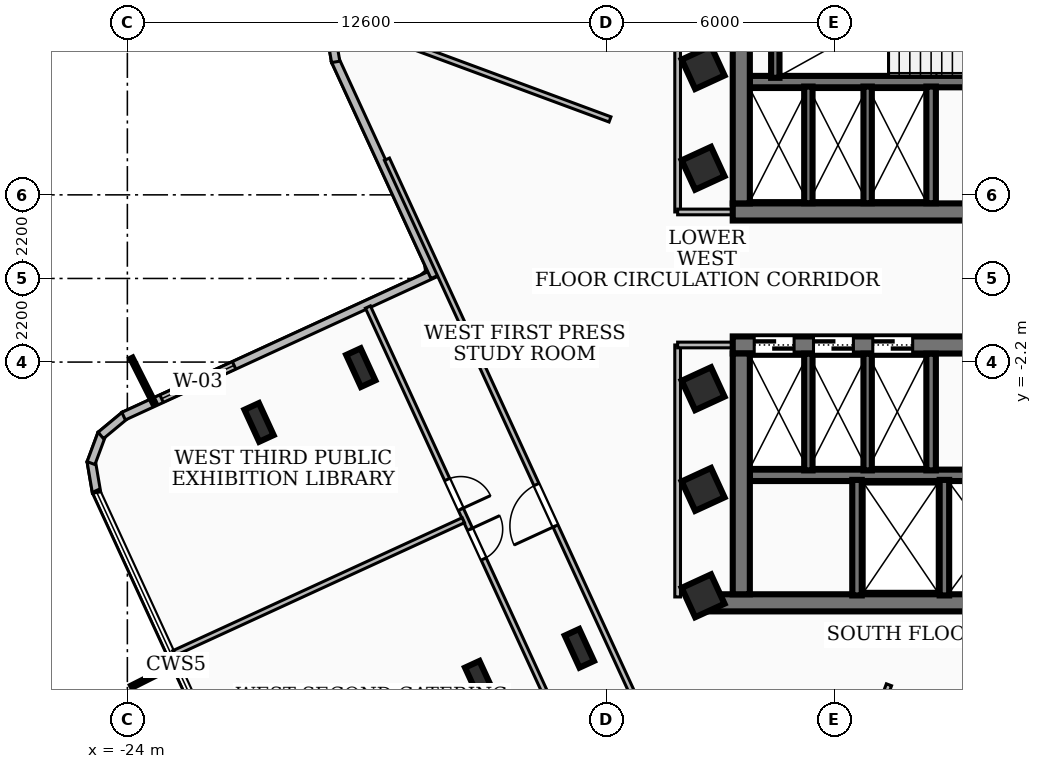
"""IFC4 building model, lengths in metres.
Left out: names, types, materials, properties, quantities, classifications, styles, units other than length and angle.
Written with IfcOpenShell. Run it as: python <this file> out.ifc"""

import sys

from ifc_helpers import new_model, si_unit, direction, frame, frame_2d, origin, origin_2d, place, context, subcontext, project, spatial, rectangle, i_section, extrude, element, fill, save


model = new_model("IFC4")
c1 = context("Model", 3, precision=1e-05, world=origin(), true_north=direction((0.0, 1.0)))
c2 = subcontext(c1, "Body", "Model", "MODEL_VIEW")
j1 = project(units=[si_unit("LENGTHUNIT", "METRE"), si_unit("PLANEANGLEUNIT", "RADIAN")], contexts=[c1])
p1 = place(None, origin())
s1 = spatial("IfcSite", under=j1, at=p1, CompositionType="ELEMENT")
p2 = place(p1, origin())
s2 = spatial("IfcBuilding", under=s1, at=p2, CompositionType="ELEMENT")
p3 = place(p2, frame((0.0, 0.0, 184.68)))
s3 = spatial("IfcBuildingStorey", under=s2, at=p3, CompositionType="ELEMENT", Elevation=184.68)
p4 = place(p3, frame((8.07, 1.75, 0.0), z_axis=(0.0, 0.0, 1.0), x_axis=(-1.0, 0.0, 0.0)))
e1 = element("IfcWall", 1, at=p4, inside=s3, PredefinedType="SHEAR", context=c2, shape_type="SweptSolid", body=[
    extrude(rectangle(XDim=16.14, YDim=0.45, at=frame_2d((8.07, 0.0))), origin(), (0.0, 0.0, 1.0), 3.34),
])
p5 = place(p4, frame((7.45, 0.0, 0.0)))
e2 = element("IfcOpeningElement", 2, at=p5, cuts=e1, PredefinedType="OPENING", context=c2, shape_type="SweptSolid", body=[
    extrude(rectangle(XDim=1.0, YDim=2.1, at=frame_2d((0.5, 1.05))), frame((0.0, 0.235, 0.0), z_axis=(0.0, -1.0, 0.0), x_axis=(1.0, 0.0, 0.0)), (0.0, 0.0, 1.0), 0.47),
])
p6 = place(p4, frame((3.4, 0.0, 0.0)))
e3 = element("IfcOpeningElement", 3, at=p6, cuts=e1, PredefinedType="OPENING", context=c2, shape_type="SweptSolid", body=[
    extrude(rectangle(XDim=0.9, YDim=2.06, at=frame_2d((0.45, 1.03))), frame((0.0, 0.235, 0.0), z_axis=(0.0, -1.0, 0.0), x_axis=(1.0, 0.0, 0.0)), (0.0, 0.0, 1.0), 0.47),
])
p7 = place(p4, frame((1.1, 0.0, 0.0)))
e4 = element("IfcOpeningElement", 4, at=p7, cuts=e1, PredefinedType="OPENING", context=c2, shape_type="SweptSolid", body=[
    extrude(rectangle(XDim=0.9, YDim=2.06, at=frame_2d((0.45, 1.03))), frame((0.0, 0.235, 0.0), z_axis=(0.0, -1.0, 0.0), x_axis=(1.0, 0.0, 0.0)), (0.0, 0.0, 1.0), 0.47),
])
p8 = place(p3, frame((-7.845, 1.975, 0.0), z_axis=(0.0, 0.0, 1.0), x_axis=(0.0, 1.0, 0.0)))
e5 = element("IfcWall", 5, at=p8, inside=s3, PredefinedType="SHEAR", context=c2, shape_type="SweptSolid", body=[
    extrude(rectangle(XDim=6.335, YDim=0.45, at=frame_2d((3.167, 0.0))), origin(), (0.0, 0.0, 1.0), 3.34),
])
p9 = place(p3, frame((7.62, 5.18, 0.0), z_axis=(0.0, 0.0, 1.0), x_axis=(-1.0, 0.0, 0.0)))
e6 = element("IfcWall", 6, at=p9, inside=s3, PredefinedType="SOLIDWALL", context=c2, shape_type="SweptSolid", body=[
    extrude(rectangle(XDim=15.24, YDim=0.3, at=frame_2d((7.62, 0.0))), origin(), (0.0, 0.0, 1.0), 3.34),
])
p10 = place(p9, frame((5.77, 0.0, 0.0)))
e7 = element("IfcOpeningElement", 7, at=p10, cuts=e6, PredefinedType="OPENING", context=c2, shape_type="SweptSolid", body=[
    extrude(rectangle(XDim=1.1, YDim=2.15, at=frame_2d((0.55, 1.075))), frame((0.0, 0.16, 0.0), z_axis=(0.0, -1.0, 0.0), x_axis=(1.0, 0.0, 0.0)), (0.0, 0.0, 1.0), 0.32),
])
p11 = place(p9, frame((2.97, 0.0, 0.0)))
e8 = element("IfcOpeningElement", 8, at=p11, cuts=e6, PredefinedType="OPENING", context=c2, shape_type="SweptSolid", body=[
    extrude(rectangle(XDim=1.1, YDim=2.15, at=frame_2d((0.55, 1.075))), frame((0.0, 0.16, 0.0), z_axis=(0.0, -1.0, 0.0), x_axis=(1.0, 0.0, 0.0)), (0.0, 0.0, 1.0), 0.32),
])
p12 = place(p9, frame((7.97, 0.0, 0.0)))
e9 = element("IfcOpeningElement", 9, at=p12, cuts=e6, PredefinedType="OPENING", context=c2, shape_type="SweptSolid", body=[
    extrude(rectangle(XDim=1.0, YDim=2.1, at=frame_2d((0.5, 1.05))), frame((0.0, 0.16, 0.0), z_axis=(0.0, -1.0, 0.0), x_axis=(1.0, 0.0, 0.0)), (0.0, 0.0, 1.0), 0.32),
])
p13 = place(p3, frame((8.78, -8.535, 0.0), z_axis=(0.0, 0.0, 1.0), x_axis=(-1.0, 0.0, 0.0)))
e10 = element("IfcWall", 10, at=p13, inside=s3, PredefinedType="SHEAR", context=c2, shape_type="SweptSolid", body=[
    extrude(rectangle(XDim=17.56, YDim=0.45, at=frame_2d((8.78, 0.0))), origin(), (0.0, 0.0, 1.0), 3.34),
])
p14 = place(p3, frame((-8.07, -1.75, 0.0), z_axis=(0.0, 0.0, 1.0), x_axis=(1.0, 0.0, 0.0)))
e11 = element("IfcWall", 11, at=p14, inside=s3, PredefinedType="SHEAR", context=c2, shape_type="SweptSolid", body=[
    extrude(rectangle(XDim=16.14, YDim=0.45, at=frame_2d((8.07, 0.0))), origin(), (0.0, 0.0, 1.0), 3.34),
])
p15 = place(p14, frame((7.45, 0.0, 0.0)))
e12 = element("IfcOpeningElement", 12, at=p15, cuts=e11, PredefinedType="OPENING", context=c2, shape_type="SweptSolid", body=[
    extrude(rectangle(XDim=1.0, YDim=2.1, at=frame_2d((0.5, 1.05))), frame((0.0, 0.235, 0.0), z_axis=(0.0, -1.0, 0.0), x_axis=(1.0, 0.0, 0.0)), (0.0, 0.0, 1.0), 0.47),
])
p16 = place(p14, frame((12.65, 0.0, 0.0)))
e13 = element("IfcOpeningElement", 13, at=p16, cuts=e11, PredefinedType="OPENING", context=c2, shape_type="SweptSolid", body=[
    extrude(rectangle(XDim=0.9, YDim=2.06, at=frame_2d((0.45, 1.03))), frame((0.0, 0.235, 0.0), z_axis=(0.0, -1.0, 0.0), x_axis=(1.0, 0.0, 0.0)), (0.0, 0.0, 1.0), 0.47),
])
p17 = place(p14, frame((0.565, 0.0, 0.0)))
e14 = element("IfcOpeningElement", 14, at=p17, cuts=e11, PredefinedType="OPENING", context=c2, shape_type="SweptSolid", body=[
    extrude(rectangle(XDim=1.05, YDim=2.15, at=frame_2d((0.525, 1.075))), frame((0.0, 0.235, 0.0), z_axis=(0.0, -1.0, 0.0), x_axis=(1.0, 0.0, 0.0)), (0.0, 0.0, 1.0), 0.47),
])
p18 = place(p14, frame((2.125, 0.0, 0.0)))
e15 = element("IfcOpeningElement", 15, at=p18, cuts=e11, PredefinedType="OPENING", context=c2, shape_type="SweptSolid", body=[
    extrude(rectangle(XDim=1.05, YDim=2.15, at=frame_2d((0.525, 1.075))), frame((0.0, 0.235, 0.0), z_axis=(0.0, -1.0, 0.0), x_axis=(1.0, 0.0, 0.0)), (0.0, 0.0, 1.0), 0.47),
])
p19 = place(p14, frame((3.685, 0.0, 0.0)))
e16 = element("IfcOpeningElement", 16, at=p19, cuts=e11, PredefinedType="OPENING", context=c2, shape_type="SweptSolid", body=[
    extrude(rectangle(XDim=1.05, YDim=2.15, at=frame_2d((0.525, 1.075))), frame((0.0, 0.235, 0.0), z_axis=(0.0, -1.0, 0.0), x_axis=(1.0, 0.0, 0.0)), (0.0, 0.0, 1.0), 0.47),
])
p20 = place(p3, frame((-7.845, -8.31, 0.0), z_axis=(0.0, 0.0, 1.0), x_axis=(0.0, 1.0, 0.0)))
e17 = element("IfcWall", 17, at=p20, inside=s3, PredefinedType="SHEAR", context=c2, shape_type="SweptSolid", body=[
    extrude(rectangle(XDim=6.335, YDim=0.45, at=frame_2d((3.167, 0.0))), origin(), (0.0, 0.0, 1.0), 3.34),
])
p21 = place(p3, frame((-7.62, -5.18, 0.0), z_axis=(0.0, 0.0, 1.0), x_axis=(1.0, 0.0, 0.0)))
e18 = element("IfcWall", 18, at=p21, inside=s3, PredefinedType="SOLIDWALL", context=c2, shape_type="SweptSolid", body=[
    extrude(rectangle(XDim=15.24, YDim=0.3, at=frame_2d((7.62, 0.0))), origin(), (0.0, 0.0, 1.0), 3.34),
])
p22 = place(p21, frame((5.77, 0.0, 0.0)))
e19 = element("IfcOpeningElement", 19, at=p22, cuts=e18, PredefinedType="OPENING", context=c2, shape_type="SweptSolid", body=[
    extrude(rectangle(XDim=1.1, YDim=2.15, at=frame_2d((0.55, 1.075))), frame((0.0, 0.16, 0.0), z_axis=(0.0, -1.0, 0.0), x_axis=(1.0, 0.0, 0.0)), (0.0, 0.0, 1.0), 0.32),
])
p23 = place(p21, frame((7.97, 0.0, 0.0)))
e20 = element("IfcOpeningElement", 20, at=p23, cuts=e18, PredefinedType="OPENING", context=c2, shape_type="SweptSolid", body=[
    extrude(rectangle(XDim=1.0, YDim=2.1, at=frame_2d((0.5, 1.05))), frame((0.0, 0.16, 0.0), z_axis=(0.0, -1.0, 0.0), x_axis=(1.0, 0.0, 0.0)), (0.0, 0.0, 1.0), 0.32),
])
p24 = place(p3, frame((-6.95, 5.28, 0.0), z_axis=(0.0, 0.0, 1.0), x_axis=(0.0, 1.0, 0.0)))
e21 = element("IfcWall", 21, at=p24, inside=s3, PredefinedType="SOLIDWALL", context=c2, shape_type="SweptSolid", body=[
    extrude(rectangle(XDim=3.06, YDim=0.22, at=frame_2d((1.53, 0.0))), origin(), (0.0, 0.0, 1.0), 3.34),
])
p25 = place(p3, frame((-2.85, 1.98, 0.0), z_axis=(0.0, 0.0, 1.0), x_axis=(0.0, 1.0, 0.0)))
e22 = element("IfcWall", 22, at=p25, inside=s3, PredefinedType="SOLIDWALL", context=c2, shape_type="SweptSolid", body=[
    extrude(rectangle(XDim=3.07, YDim=0.25, at=frame_2d((1.535, 0.0))), origin(), (0.0, 0.0, 1.0), 3.34),
])
for number, where, z_axis, x_axis in (
    (23, (-2.5, -8.34, 0.0), (0.0, 0.0, 1.0), (0.0, 1.0, 0.0)),
    (24, (-4.8, -8.34, 0.0), (0.0, 0.0, 1.0), (0.0, 1.0, 0.0)),
):
    element("IfcWall", number, at=place(p3, frame(where, z_axis=z_axis, x_axis=x_axis)), inside=s3, PredefinedType="SOLIDWALL", context=c2, shape_type="SweptSolid", body=[
        extrude(rectangle(XDim=3.04, YDim=0.25, at=frame_2d((1.52, 0.0))), origin(), (0.0, 0.0, 1.0), 3.34),
    ])
p26 = place(p3, frame((-2.85, -5.05, 0.0), z_axis=(0.0, 0.0, 1.0), x_axis=(0.0, 1.0, 0.0)))
e25 = element("IfcWall", 25, at=p26, inside=s3, PredefinedType="SOLIDWALL", context=c2, shape_type="SweptSolid", body=[
    extrude(rectangle(XDim=3.07, YDim=0.25, at=frame_2d((1.535, 0.0))), origin(), (0.0, 0.0, 1.0), 3.34),
])
for number, where, z_axis, x_axis in (
    (26, (-6.08, 1.98, 0.0), (0.0, 0.0, 1.0), (0.0, 1.0, 0.0)),
    (27, (-4.52, 1.98, 0.0), (0.0, 0.0, 1.0), (0.0, 1.0, 0.0)),
    (28, (-6.08, -5.05, 0.0), (0.0, 0.0, 1.0), (0.0, 1.0, 0.0)),
    (29, (-4.52, -5.05, 0.0), (0.0, 0.0, 1.0), (0.0, 1.0, 0.0)),
):
    element("IfcWall", number, at=place(p3, frame(where, z_axis=z_axis, x_axis=x_axis)), inside=s3, PredefinedType="SOLIDWALL", context=c2, shape_type="SweptSolid", body=[
        extrude(rectangle(XDim=3.07, YDim=0.22, at=frame_2d((1.535, 0.0))), origin(), (0.0, 0.0, 1.0), 3.34),
    ])
for number, where, z_axis, x_axis in (
    (30, (-8.85, -5.55, 0.0), (0.0, 0.0, 1.0), (0.909, 0.418, 0.0)),
    (31, (-8.85, -2.9, 0.0), (0.0, 0.0, 1.0), (0.909, 0.418, 0.0)),
    (32, (-8.85, 2.9, 0.0), (0.0, 0.0, 1.0), (0.909, 0.418, 0.0)),
    (33, (-8.85, 5.55, 0.0), (0.0, 0.0, 1.0), (0.909, 0.418, 0.0)),
    (34, (-8.85, -8.35, 0.0), (0.0, 0.0, 1.0), (0.909, 0.418, 0.0)),
):
    element("IfcColumn", number, at=place(p3, frame(where, z_axis=z_axis, x_axis=x_axis)), inside=s3, PredefinedType="COLUMN", context=c2, shape_type="SweptSolid", body=[
        extrude(rectangle(XDim=0.85, YDim=0.85, at=origin_2d()), origin(), (0.0, 0.0, 1.0), 3.6),
    ])
for number, where, z_axis, x_axis in (
    (35, (-17.858, -2.346, 0.0), (0.0, 0.0, 1.0), (0.909, 0.418, 0.0)),
    (36, (-12.106, -9.731, 0.0), (0.0, 0.0, 1.0), (0.909, 0.418, 0.0)),
    (37, (-20.535, -3.788, 0.0), (0.0, 0.0, 1.0), (0.909, 0.418, 0.0)),
    (38, (-14.731, -10.573, 0.0), (0.0, 0.0, 1.0), (0.909, 0.418, 0.0)),
):
    element("IfcColumn", number, at=place(p3, frame(where, z_axis=z_axis, x_axis=x_axis)), inside=s3, PredefinedType="COLUMN", context=c2, shape_type="SweptSolid", body=[
        extrude(i_section(OverallWidth=0.418, OverallDepth=0.927, WebThickness=0.019, FlangeThickness=0.032, at=origin_2d()), origin(), (0.0, 0.0, 1.0), 3.6),
    ])
p27 = place(p3, frame((-24.811, -5.633, 0.0), z_axis=(0.0, 0.0, 1.0), x_axis=(-0.167575597201, 0.985859228908, 0.0)))
e39 = element("IfcWall", 39, at=p27, inside=s3, PredefinedType="SOLIDWALL", context=c2, shape_type="SweptSolid", body=[
    extrude(rectangle(XDim=0.835, YDim=0.22, at=frame_2d((0.417, 0.0))), origin(), (0.0, 0.0, 1.0), 3.34),
])
p28 = place(p3, frame((-24.956, -4.858, 0.0), z_axis=(0.0, 0.0, 1.0), x_axis=(0.348538641681, 0.937294412261, 0.0)))
e40 = element("IfcWall", 40, at=p28, inside=s3, PredefinedType="SOLIDWALL", context=c2, shape_type="SweptSolid", body=[
    extrude(rectangle(XDim=0.818, YDim=0.22, at=frame_2d((0.409, 0.0))), origin(), (0.0, 0.0, 1.0), 3.34),
])
p29 = place(p3, frame((-24.699, -4.13, 0.0), z_axis=(0.0, 0.0, 1.0), x_axis=(0.769466854359, 0.638686746413, 0.0)))
e41 = element("IfcWall", 41, at=p29, inside=s3, PredefinedType="SOLIDWALL", context=c2, shape_type="SweptSolid", body=[
    extrude(rectangle(XDim=0.834, YDim=0.22, at=frame_2d((0.417, 0.0))), origin(), (0.0, 0.0, 1.0), 3.34),
])
p30 = place(p3, frame((-24.099, -3.623, 0.0), z_axis=(0.0, 0.0, 1.0), x_axis=(0.908673527814, 0.417507388977, 0.0)))
e42 = element("IfcWall", 42, at=p30, inside=s3, PredefinedType="SOLIDWALL", context=c2, shape_type="SweptSolid", body=[
    extrude(rectangle(XDim=9.059, YDim=0.22, at=frame_2d((4.529, 0.0))), origin(), (0.0, 0.0, 1.0), 3.34),
])
p31 = place(p30, frame((1.1, 0.0, 0.85)))
e43 = element("IfcOpeningElement", 43, at=p31, cuts=e42, PredefinedType="OPENING", context=c2, shape_type="SweptSolid", body=[
    extrude(rectangle(XDim=2.1, YDim=2.0, at=frame_2d((1.05, 1.0))), frame((0.0, 0.12, 0.0), z_axis=(0.0, -1.0, 0.0), x_axis=(1.0, 0.0, 0.0)), (0.0, 0.0, 1.0), 0.24),
])
p32 = place(p3, frame((-15.911, 0.042, 0.0), z_axis=(0.0, 0.0, 1.0), x_axis=(-0.417479344719, 0.908686412759, 0.0)))
e44 = element("IfcWall", 44, at=p32, inside=s3, PredefinedType="SOLIDWALL", context=c2, shape_type="SweptSolid", body=[
    extrude(rectangle(XDim=6.278, YDim=0.22, at=frame_2d((3.139, 0.0))), origin(), (0.0, 0.0, 1.0), 3.34),
])
p33 = place(p3, frame((-18.518, 5.699, 0.0), z_axis=(0.0, 0.0, 1.0), x_axis=(-0.167382556682, 0.985892022342, 0.0)))
e45 = element("IfcWall", 45, at=p33, inside=s3, PredefinedType="SOLIDWALL", context=c2, shape_type="SweptSolid", body=[
    extrude(rectangle(XDim=0.836, YDim=0.22, at=frame_2d((0.418, 0.0))), origin(), (0.0, 0.0, 1.0), 3.34),
])
p34 = place(p3, frame((-9.52, 1.75, 0.0), z_axis=(0.0, 0.0, 1.0), x_axis=(0.0, 1.0, 0.0)))
e46 = element("IfcWall", 46, at=p34, inside=s3, PredefinedType="PARTITIONING", context=c2, shape_type="SweptSolid", body=[
    extrude(rectangle(XDim=6.63, YDim=0.15, at=frame_2d((3.315, 0.0))), origin(), (0.0, 0.0, 1.0), 3.34),
])
p35 = place(p3, frame((-7.85, 1.75, 0.0), z_axis=(0.0, 0.0, 1.0), x_axis=(-1.0, 0.0, 0.0)))
e47 = element("IfcWall", 47, at=p35, inside=s3, PredefinedType="PARTITIONING", context=c2, shape_type="SweptSolid", body=[
    extrude(rectangle(XDim=1.67, YDim=0.15, at=frame_2d((0.835, 0.0))), origin(), (0.0, 0.0, 1.0), 2.57),
])
p36 = place(p3, frame((-9.52, -8.38, 0.0), z_axis=(0.0, 0.0, 1.0), x_axis=(0.0, 1.0, 0.0)))
e48 = element("IfcWall", 48, at=p36, inside=s3, PredefinedType="PARTITIONING", context=c2, shape_type="SweptSolid", body=[
    extrude(rectangle(XDim=6.63, YDim=0.15, at=frame_2d((3.315, 0.0))), origin(), (0.0, 0.0, 1.0), 2.644),
])
p37 = place(p3, frame((-7.85, -1.75, 0.0), z_axis=(0.0, 0.0, 1.0), x_axis=(-1.0, 0.0, 0.0)))
e49 = element("IfcWall", 49, at=p37, inside=s3, PredefinedType="PARTITIONING", context=c2, shape_type="SweptSolid", body=[
    extrude(rectangle(XDim=1.67, YDim=0.15, at=frame_2d((0.835, 0.0))), origin(), (0.0, 0.0, 1.0), 2.57),
])
p38 = place(p3, frame((-11.3, 4.185, 0.0), z_axis=(0.0, 0.0, 1.0), x_axis=(-0.937797421925, 0.347182942311, 0.0)))
e50 = element("IfcWall", 50, at=p38, inside=s3, PredefinedType="PARTITIONING", context=c2, shape_type="SweptSolid", body=[
    extrude(rectangle(XDim=7.624, YDim=0.145, at=frame_2d((3.812, 0.0))), origin(), (0.0, 0.0, 1.0), 3.34),
])
p39 = place(p3, frame((-3.959, -10.691, 0.0), z_axis=(0.0, 0.0, 1.0), x_axis=(-0.347243238044, -0.937775097576, 0.0)))
e51 = element("IfcWall", 51, at=p39, inside=s3, PredefinedType="PARTITIONING", context=c2, shape_type="SweptSolid", body=[
    extrude(rectangle(XDim=8.274, YDim=0.145, at=frame_2d((4.137, 0.0))), origin(), (0.0, 0.0, 1.0), 3.34),
])
p40 = place(p3, frame((-8.6, -15.508, 0.0), z_axis=(0.0, 0.0, 1.0), x_axis=(-0.41757132443, 0.908644148726, 0.0)))
e52 = element("IfcWall", 52, at=p40, inside=s3, PredefinedType="PARTITIONING", context=c2, shape_type="SweptSolid", body=[
    extrude(rectangle(XDim=20.521, YDim=0.145, at=frame_2d((10.26, 0.0))), origin(), (0.0, 0.0, 1.0), 2.644),
])
p41 = place(p40, frame((9.9, 0.0, 0.0)))
e53 = element("IfcOpeningElement", 53, at=p41, cuts=e52, PredefinedType="OPENING", context=c2, shape_type="SweptSolid", body=[
    extrude(rectangle(XDim=1.2, YDim=2.1, at=frame_2d((0.6, 1.05))), frame((0.0, 0.083, 0.0), z_axis=(0.0, -1.0, 0.0), x_axis=(1.0, 0.0, 0.0)), (0.0, 0.0, 1.0), 0.165),
])
p42 = place(p3, frame((-15.159, -6.361, 0.0), z_axis=(0.0, 0.0, 1.0), x_axis=(-0.90866370778, -0.417528760881, 0.0)))
e54 = element("IfcWall", 54, at=p42, inside=s3, PredefinedType="PARTITIONING", context=c2, shape_type="SweptSolid", body=[
    extrude(rectangle(XDim=8.385, YDim=0.145, at=frame_2d((4.192, 0.0))), origin(), (0.0, 0.0, 1.0), 3.34),
])
p43 = place(p3, frame((-17.67, -0.752, 0.0), z_axis=(0.0, 0.0, 1.0), x_axis=(0.41749974953, -0.908677037864, 0.0)))
e55 = element("IfcWall", 55, at=p43, inside=s3, PredefinedType="PARTITIONING", context=c2, shape_type="SweptSolid", body=[
    extrude(rectangle(XDim=12.91, YDim=0.145, at=frame_2d((6.455, 0.0))), origin(), (0.0, 0.0, 1.0), 2.644),
])
p44 = place(p43, frame((4.995, 0.0, 0.0)))
e56 = element("IfcOpeningElement", 56, at=p44, cuts=e55, PredefinedType="OPENING", context=c2, shape_type="SweptSolid", body=[
    extrude(rectangle(XDim=0.86, YDim=2.04, at=frame_2d((0.43, 1.02))), frame((0.0, 0.083, 0.0), z_axis=(0.0, -1.0, 0.0), x_axis=(1.0, 0.0, 0.0)), (0.0, 0.0, 1.0), 0.165),
])
p45 = place(p43, frame((6.435, 0.0, 0.0)))
e57 = element("IfcOpeningElement", 57, at=p45, cuts=e55, PredefinedType="OPENING", context=c2, shape_type="SweptSolid", body=[
    extrude(rectangle(XDim=0.86, YDim=2.04, at=frame_2d((0.43, 1.02))), frame((0.0, 0.083, 0.0), z_axis=(0.0, -1.0, 0.0), x_axis=(1.0, 0.0, 0.0)), (0.0, 0.0, 1.0), 0.165),
])
p46 = place(p3, frame((15.508, -8.6, 0.0), z_axis=(0.0, 0.0, 1.0), x_axis=(-0.908644148726, -0.41757132443, 0.0)))
e58 = element("IfcWall", 58, at=p46, inside=s3, PredefinedType="PARTITIONING", context=c2, shape_type="SweptSolid", body=[
    extrude(rectangle(XDim=20.521, YDim=0.145, at=frame_2d((10.26, 0.0))), origin(), (0.0, 0.0, 1.0), 2.644),
])
p47 = place(p46, frame((9.9, 0.0, 0.0)))
e59 = element("IfcOpeningElement", 59, at=p47, cuts=e58, PredefinedType="OPENING", context=c2, shape_type="SweptSolid", body=[
    extrude(rectangle(XDim=1.2, YDim=2.1, at=frame_2d((0.6, 1.05))), frame((0.0, 0.083, 0.0), z_axis=(0.0, -1.0, 0.0), x_axis=(1.0, 0.0, 0.0)), (0.0, 0.0, 1.0), 0.165),
])
p48 = place(p31, origin())
e60 = element("IfcWindow", 60, at=p48, inside=s3, PartitioningType="SINGLE_PANEL", PredefinedType="WINDOW", context=c2, shape_type="SweptSolid", body=[
    extrude(rectangle(XDim=2.1, YDim=2.0, at=frame_2d((1.05, 1.0))), frame((0.0, 0.03, 0.0), z_axis=(0.0, -1.0, 0.0), x_axis=(1.0, 0.0, 0.0)), (0.0, 0.0, 1.0), 0.06),
])
fill(e43, e60)
p49 = place(p17, origin())
e61 = element("IfcDoor", 61, at=p49, inside=s3, OperationType="DOUBLE_DOOR_SLIDING", PredefinedType="DOOR", context=c2, shape_type="SweptSolid", body=[
    extrude(rectangle(XDim=1.05, YDim=2.15, at=frame_2d((0.525, 1.075))), frame((0.0, 0.025, 0.0), z_axis=(0.0, -1.0, 0.0), x_axis=(1.0, 0.0, 0.0)), (0.0, 0.0, 1.0), 0.05),
])
fill(e14, e61)
p50 = place(p18, origin())
e62 = element("IfcDoor", 62, at=p50, inside=s3, OperationType="DOUBLE_DOOR_SLIDING", PredefinedType="DOOR", context=c2, shape_type="SweptSolid", body=[
    extrude(rectangle(XDim=1.05, YDim=2.15, at=frame_2d((0.525, 1.075))), frame((0.0, 0.025, 0.0), z_axis=(0.0, -1.0, 0.0), x_axis=(1.0, 0.0, 0.0)), (0.0, 0.0, 1.0), 0.05),
])
fill(e15, e62)
p51 = place(p19, origin())
e63 = element("IfcDoor", 63, at=p51, inside=s3, OperationType="DOUBLE_DOOR_SLIDING", PredefinedType="DOOR", context=c2, shape_type="SweptSolid", body=[
    extrude(rectangle(XDim=1.05, YDim=2.15, at=frame_2d((0.525, 1.075))), frame((0.0, 0.025, 0.0), z_axis=(0.0, -1.0, 0.0), x_axis=(1.0, 0.0, 0.0)), (0.0, 0.0, 1.0), 0.05),
])
fill(e16, e63)
p52 = place(p41, origin())
e64 = element("IfcDoor", 64, at=p52, inside=s3, OperationType="SINGLE_SWING_LEFT", PredefinedType="DOOR", context=c2, shape_type="SweptSolid", body=[
    extrude(rectangle(XDim=1.2, YDim=2.1, at=frame_2d((0.6, 1.05))), frame((0.0, 0.025, 0.0), z_axis=(0.0, -1.0, 0.0), x_axis=(1.0, 0.0, 0.0)), (0.0, 0.0, 1.0), 0.05),
])
fill(e53, e64)
p53 = place(p44, origin())
e65 = element("IfcDoor", 65, at=p53, inside=s3, OperationType="SINGLE_SWING_RIGHT", PredefinedType="DOOR", context=c2, shape_type="SweptSolid", body=[
    extrude(rectangle(XDim=0.86, YDim=2.04, at=frame_2d((0.43, 1.02))), frame((0.0, 0.025, 0.0), z_axis=(0.0, -1.0, 0.0), x_axis=(1.0, 0.0, 0.0)), (0.0, 0.0, 1.0), 0.05),
])
fill(e56, e65)
p54 = place(p45, origin())
e66 = element("IfcDoor", 66, at=p54, inside=s3, OperationType="SINGLE_SWING_LEFT", PredefinedType="DOOR", context=c2, shape_type="SweptSolid", body=[
    extrude(rectangle(XDim=0.86, YDim=2.04, at=frame_2d((0.43, 1.02))), frame((0.0, 0.025, 0.0), z_axis=(0.0, -1.0, 0.0), x_axis=(1.0, 0.0, 0.0)), (0.0, 0.0, 1.0), 0.05),
])
fill(e57, e66)
save(model, sys.argv[1])
